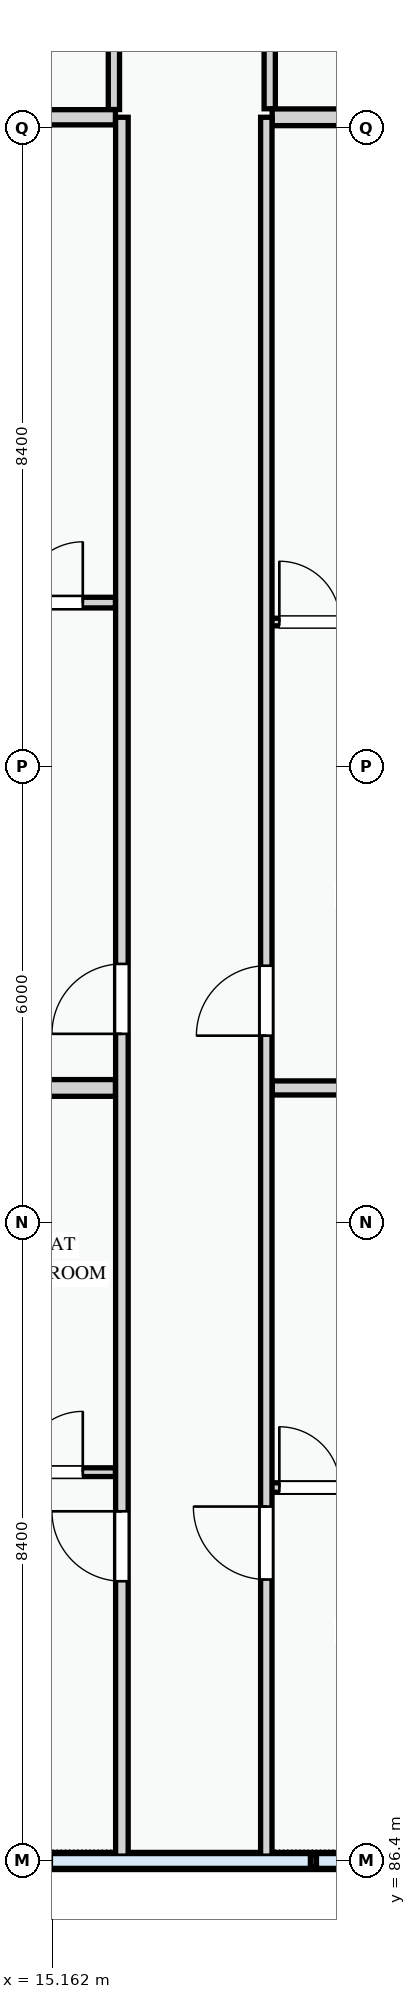
"""IFC4 building model, lengths in metres.
Left out: names, types, materials, properties, quantities, classifications, styles, units other than length and angle.
Written with IfcOpenShell. Run it as: python <this file> out.ifc"""

import sys

from ifc_helpers import new_model, si_unit, direction, frame, frame_2d, origin, place, context, subcontext, project, spatial, rectangle, extrude, element, fill, save


model = new_model("IFC4")
c1 = context("Model", 3, precision=1e-05, world=origin(), true_north=direction((0.0, 1.0)))
c2 = subcontext(c1, "Body", "Model", "MODEL_VIEW")
j1 = project(units=[si_unit("LENGTHUNIT", "METRE"), si_unit("PLANEANGLEUNIT", "RADIAN")], contexts=[c1])
p1 = place(None, origin())
s1 = spatial("IfcSite", under=j1, at=p1, CompositionType="ELEMENT")
p2 = place(p1, origin())
s2 = spatial("IfcBuilding", under=s1, at=p2, CompositionType="ELEMENT")
p3 = place(p2, frame((0.0, 0.0, 51.0)))
s3 = spatial("IfcBuildingStorey", under=s2, at=p3, CompositionType="ELEMENT", Elevation=51.0)
p4 = place(p3, frame((8.4, 86.4, 3.3), z_axis=(0.0, 0.0, 1.0), x_axis=(1.0, 0.0, 0.0)))
e1 = element("IfcWall", 1, at=p4, inside=s3, PredefinedType="PARAPET", context=c2, shape_type="SweptSolid", body=[
    extrude(rectangle(XDim=14.4, YDim=0.225, at=frame_2d((7.2, 0.0))), origin(), (0.0, 0.0, 1.0), 1.15),
])
p5 = place(p3, frame((15.975, 113.324, 0.0), z_axis=(0.0, 0.0, 1.0), x_axis=(0.0, -1.0, 0.0)))
e2 = element("IfcWall", 2, at=p5, inside=s3, PredefinedType="PARTITIONING", context=c2, shape_type="SweptSolid", body=[
    extrude(rectangle(XDim=3.882, YDim=0.148, at=frame_2d((1.941, 0.0))), origin(), (0.0, 0.0, 1.0), 3.0),
])
p6 = place(p3, frame((18.025, 113.324, 0.0), z_axis=(0.0, 0.0, 1.0), x_axis=(0.0, -1.0, 0.0)))
e3 = element("IfcWall", 3, at=p6, inside=s3, PredefinedType="PARTITIONING", context=c2, shape_type="SweptSolid", body=[
    extrude(rectangle(XDim=3.872, YDim=0.148, at=frame_2d((1.936, 0.0))), origin(), (0.0, 0.0, 1.0), 3.0),
])
p7 = place(p3, frame((8.57, 91.515, 0.0), z_axis=(0.0, 0.0, 1.0), x_axis=(1.0, 0.0, 0.0)))
e4 = element("IfcWall", 4, at=p7, inside=s3, PredefinedType="PARTITIONING", context=c2, shape_type="SweptSolid", body=[
    extrude(rectangle(XDim=7.426, YDim=0.115, at=frame_2d((3.713, 0.0))), origin(), (0.0, 0.0, 1.0), 3.0),
])
p8 = place(p7, frame((1.294, 0.0, 0.0)))
e5 = element("IfcOpeningElement", 5, at=p8, cuts=e4, PredefinedType="OPENING", context=c2, shape_type="SweptSolid", body=[
    extrude(rectangle(XDim=0.85, YDim=2.1, at=frame_2d((0.425, 1.05))), frame((0.0, 0.067, 0.0), z_axis=(0.0, -1.0, 0.0), x_axis=(1.0, 0.0, 0.0)), (0.0, 0.0, 1.0), 0.135),
])
p9 = place(p7, frame((4.19, 0.0, 0.0)))
e6 = element("IfcOpeningElement", 6, at=p9, cuts=e4, PredefinedType="OPENING", context=c2, shape_type="SweptSolid", body=[
    extrude(rectangle(XDim=0.85, YDim=2.1, at=frame_2d((0.425, 1.05))), frame((0.0, 0.067, 0.0), z_axis=(0.0, -1.0, 0.0), x_axis=(1.0, 0.0, 0.0)), (0.0, 0.0, 1.0), 0.135),
])
p10 = place(p7, frame((6.196, 0.0, 0.0)))
e7 = element("IfcOpeningElement", 7, at=p10, cuts=e4, PredefinedType="OPENING", context=c2, shape_type="SweptSolid", body=[
    extrude(rectangle(XDim=0.8, YDim=2.1, at=frame_2d((0.4, 1.05))), frame((0.0, 0.067, 0.0), z_axis=(0.0, -1.0, 0.0), x_axis=(1.0, 0.0, 0.0)), (0.0, 0.0, 1.0), 0.135),
])
p11 = place(p3, frame((17.98, 91.313, 0.0), z_axis=(0.0, 0.0, 1.0), x_axis=(1.0, 0.0, 0.0)))
e8 = element("IfcWall", 8, at=p11, inside=s3, PredefinedType="PARTITIONING", context=c2, shape_type="SweptSolid", body=[
    extrude(rectangle(XDim=4.651, YDim=0.125, at=frame_2d((2.325, 0.0))), origin(), (0.0, 0.0, 1.0), 3.0),
])
p12 = place(p11, frame((0.171, 0.0, 0.0)))
e9 = element("IfcOpeningElement", 9, at=p12, cuts=e8, PredefinedType="OPENING", context=c2, shape_type="SweptSolid", body=[
    extrude(rectangle(XDim=0.8, YDim=2.1, at=frame_2d((0.4, 1.05))), frame((0.0, 0.073, 0.0), z_axis=(0.0, -1.0, 0.0), x_axis=(1.0, 0.0, 0.0)), (0.0, 0.0, 1.0), 0.145),
])
p13 = place(p11, frame((1.384, 0.0, 0.0)))
e10 = element("IfcOpeningElement", 10, at=p13, cuts=e8, PredefinedType="OPENING", context=c2, shape_type="SweptSolid", body=[
    extrude(rectangle(XDim=0.85, YDim=2.1, at=frame_2d((0.425, 1.05))), frame((0.0, 0.073, 0.0), z_axis=(0.0, -1.0, 0.0), x_axis=(1.0, 0.0, 0.0)), (0.0, 0.0, 1.0), 0.145),
])
p14 = place(p11, frame((3.193, 0.0, 0.0)))
e11 = element("IfcOpeningElement", 11, at=p14, cuts=e8, PredefinedType="OPENING", context=c2, shape_type="SweptSolid", body=[
    extrude(rectangle(XDim=0.85, YDim=2.1, at=frame_2d((0.425, 1.05))), frame((0.0, 0.073, 0.0), z_axis=(0.0, -1.0, 0.0), x_axis=(1.0, 0.0, 0.0)), (0.0, 0.0, 1.0), 0.145),
])
p15 = place(p3, frame((8.57, 102.955, 0.0), z_axis=(0.0, 0.0, 1.0), x_axis=(1.0, 0.0, 0.0)))
e12 = element("IfcWall", 12, at=p15, inside=s3, PredefinedType="PARTITIONING", context=c2, shape_type="SweptSolid", body=[
    extrude(rectangle(XDim=7.426, YDim=0.14, at=frame_2d((3.713, 0.0))), origin(), (0.0, 0.0, 1.0), 3.0),
])
p16 = place(p15, frame((1.294, 0.0, 0.0)))
e13 = element("IfcOpeningElement", 13, at=p16, cuts=e12, PredefinedType="OPENING", context=c2, shape_type="SweptSolid", body=[
    extrude(rectangle(XDim=0.85, YDim=2.1, at=frame_2d((0.425, 1.05))), frame((0.0, 0.08, 0.0), z_axis=(0.0, -1.0, 0.0), x_axis=(1.0, 0.0, 0.0)), (0.0, 0.0, 1.0), 0.16),
])
p17 = place(p15, frame((4.19, 0.0, 0.0)))
e14 = element("IfcOpeningElement", 14, at=p17, cuts=e12, PredefinedType="OPENING", context=c2, shape_type="SweptSolid", body=[
    extrude(rectangle(XDim=0.82, YDim=2.08, at=frame_2d((0.41, 1.04))), frame((0.0, 0.08, 0.0), z_axis=(0.0, -1.0, 0.0), x_axis=(1.0, 0.0, 0.0)), (0.0, 0.0, 1.0), 0.16),
])
p18 = place(p15, frame((6.196, 0.0, 0.0)))
e15 = element("IfcOpeningElement", 15, at=p18, cuts=e12, PredefinedType="OPENING", context=c2, shape_type="SweptSolid", body=[
    extrude(rectangle(XDim=0.8, YDim=2.1, at=frame_2d((0.4, 1.05))), frame((0.0, 0.08, 0.0), z_axis=(0.0, -1.0, 0.0), x_axis=(1.0, 0.0, 0.0)), (0.0, 0.0, 1.0), 0.16),
])
p19 = place(p3, frame((17.98, 102.7, 0.0), z_axis=(0.0, 0.0, 1.0), x_axis=(1.0, 0.0, 0.0)))
e16 = element("IfcWall", 16, at=p19, inside=s3, PredefinedType="PARTITIONING", context=c2, shape_type="SweptSolid", body=[
    extrude(rectangle(XDim=4.651, YDim=0.1, at=frame_2d((2.325, 0.0))), origin(), (0.0, 0.0, 1.0), 3.0),
])
p20 = place(p19, frame((0.171, 0.0, 0.0)))
e17 = element("IfcOpeningElement", 17, at=p20, cuts=e16, PredefinedType="OPENING", context=c2, shape_type="SweptSolid", body=[
    extrude(rectangle(XDim=0.8, YDim=2.1, at=frame_2d((0.4, 1.05))), frame((0.0, 0.06, 0.0), z_axis=(0.0, -1.0, 0.0), x_axis=(1.0, 0.0, 0.0)), (0.0, 0.0, 1.0), 0.12),
])
p21 = place(p19, frame((1.384, 0.0, 0.0)))
e18 = element("IfcOpeningElement", 18, at=p21, cuts=e16, PredefinedType="OPENING", context=c2, shape_type="SweptSolid", body=[
    extrude(rectangle(XDim=0.85, YDim=2.1, at=frame_2d((0.425, 1.05))), frame((0.0, 0.06, 0.0), z_axis=(0.0, -1.0, 0.0), x_axis=(1.0, 0.0, 0.0)), (0.0, 0.0, 1.0), 0.12),
])
p22 = place(p19, frame((3.193, 0.0, 0.0)))
e19 = element("IfcOpeningElement", 19, at=p22, cuts=e16, PredefinedType="OPENING", context=c2, shape_type="SweptSolid", body=[
    extrude(rectangle(XDim=0.82, YDim=2.08, at=frame_2d((0.41, 1.04))), frame((0.0, 0.06, 0.0), z_axis=(0.0, -1.0, 0.0), x_axis=(1.0, 0.0, 0.0)), (0.0, 0.0, 1.0), 0.12),
])
p23 = place(p3, frame((8.57, 96.57, 0.0), z_axis=(0.0, 0.0, 1.0), x_axis=(1.0, 0.0, 0.0)))
e20 = element("IfcWall", 20, at=p23, inside=s3, PredefinedType="PARTITIONING", context=c2, shape_type="SweptSolid", body=[
    extrude(rectangle(XDim=7.426, YDim=0.22, at=frame_2d((3.713, 0.0))), origin(), (0.0, 0.0, 1.0), 3.0),
])
p24 = place(p3, frame((18.057, 96.57, 0.0), z_axis=(0.0, 0.0, 1.0), x_axis=(1.0, 0.0, 0.0)))
e21 = element("IfcWall", 21, at=p24, inside=s3, PredefinedType="PARTITIONING", context=c2, shape_type="SweptSolid", body=[
    extrude(rectangle(XDim=4.683, YDim=0.185, at=frame_2d((2.342, 0.0))), origin(), (0.0, 0.0, 1.0), 3.0),
])
p25 = place(p3, frame((8.57, 109.34, 0.0), z_axis=(0.0, 0.0, 1.0), x_axis=(1.0, 0.0, 0.0)))
e22 = element("IfcWall", 22, at=p25, inside=s3, PredefinedType="PARTITIONING", context=c2, shape_type="SweptSolid", body=[
    extrude(rectangle(XDim=7.426, YDim=0.2, at=frame_2d((3.713, 0.0))), origin(), (0.0, 0.0, 1.0), 2.395),
])
p26 = place(p3, frame((18.057, 109.34, 0.0), z_axis=(0.0, 0.0, 1.0), x_axis=(1.0, 0.0, 0.0)))
e23 = element("IfcWall", 23, at=p26, inside=s3, PredefinedType="PARTITIONING", context=c2, shape_type="SweptSolid", body=[
    extrude(rectangle(XDim=4.683, YDim=0.22, at=frame_2d((2.342, 0.0))), origin(), (0.0, 0.0, 1.0), 2.395),
])
p27 = place(p3, frame((16.08, 86.46, 0.0), z_axis=(0.0, 0.0, 1.0), x_axis=(0.0, 1.0, 0.0)))
e24 = element("IfcWall", 24, at=p27, inside=s3, PredefinedType="PARTITIONING", context=c2, shape_type="SweptSolid", body=[
    extrude(rectangle(XDim=22.88, YDim=0.165, at=frame_2d((11.44, 0.0))), origin(), (0.0, 0.0, 1.0), 3.0),
])
p28 = place(p27, frame((3.62, 0.0, 0.0)))
e25 = element("IfcOpeningElement", 25, at=p28, cuts=e24, PredefinedType="OPENING", context=c2, shape_type="SweptSolid", body=[
    extrude(rectangle(XDim=0.92, YDim=2.1, at=frame_2d((0.46, 1.05))), frame((0.0, 0.093, 0.0), z_axis=(0.0, -1.0, 0.0), x_axis=(1.0, 0.0, 0.0)), (0.0, 0.0, 1.0), 0.185),
])
p29 = place(p27, frame((10.822, 0.0, 0.0)))
e26 = element("IfcOpeningElement", 26, at=p29, cuts=e24, PredefinedType="OPENING", context=c2, shape_type="SweptSolid", body=[
    extrude(rectangle(XDim=0.92, YDim=2.1, at=frame_2d((0.46, 1.05))), frame((0.0, 0.093, 0.0), z_axis=(0.0, -1.0, 0.0), x_axis=(1.0, 0.0, 0.0)), (0.0, 0.0, 1.0), 0.185),
])
p30 = place(p3, frame((17.98, 86.46, 0.0), z_axis=(0.0, 0.0, 1.0), x_axis=(0.0, 1.0, 0.0)))
e27 = element("IfcWall", 27, at=p30, inside=s3, PredefinedType="PARTITIONING", context=c2, shape_type="SweptSolid", body=[
    extrude(rectangle(XDim=22.88, YDim=0.15, at=frame_2d((11.44, 0.0))), origin(), (0.0, 0.0, 1.0), 3.0),
])
p31 = place(p30, frame((3.643, 0.0, 0.0)))
e28 = element("IfcOpeningElement", 28, at=p31, cuts=e27, PredefinedType="OPENING", context=c2, shape_type="SweptSolid", body=[
    extrude(rectangle(XDim=0.96, YDim=2.12, at=frame_2d((0.48, 1.06))), frame((0.0, 0.085, 0.0), z_axis=(0.0, -1.0, 0.0), x_axis=(1.0, 0.0, 0.0)), (0.0, 0.0, 1.0), 0.17),
])
p32 = place(p30, frame((10.798, 0.0, 0.0)))
e29 = element("IfcOpeningElement", 29, at=p32, cuts=e27, PredefinedType="OPENING", context=c2, shape_type="SweptSolid", body=[
    extrude(rectangle(XDim=0.92, YDim=2.1, at=frame_2d((0.46, 1.05))), frame((0.0, 0.085, 0.0), z_axis=(0.0, -1.0, 0.0), x_axis=(1.0, 0.0, 0.0)), (0.0, 0.0, 1.0), 0.17),
])
p33 = place(p10, origin())
e30 = element("IfcDoor", 30, at=p33, inside=s3, OperationType="SINGLE_SWING_RIGHT", PredefinedType="DOOR", context=c2, shape_type="SweptSolid", body=[
    extrude(rectangle(XDim=0.8, YDim=2.1, at=frame_2d((0.4, 1.05))), frame((0.0, 0.025, 0.0), z_axis=(0.0, -1.0, 0.0), x_axis=(1.0, 0.0, 0.0)), (0.0, 0.0, 1.0), 0.05),
])
fill(e7, e30)
p34 = place(p12, origin())
e31 = element("IfcDoor", 31, at=p34, inside=s3, OperationType="SINGLE_SWING_LEFT", PredefinedType="DOOR", context=c2, shape_type="SweptSolid", body=[
    extrude(rectangle(XDim=0.8, YDim=2.1, at=frame_2d((0.4, 1.05))), frame((0.0, 0.025, 0.0), z_axis=(0.0, -1.0, 0.0), x_axis=(1.0, 0.0, 0.0)), (0.0, 0.0, 1.0), 0.05),
])
fill(e9, e31)
p35 = place(p18, origin())
e32 = element("IfcDoor", 32, at=p35, inside=s3, OperationType="SINGLE_SWING_RIGHT", PredefinedType="DOOR", context=c2, shape_type="SweptSolid", body=[
    extrude(rectangle(XDim=0.8, YDim=2.1, at=frame_2d((0.4, 1.05))), frame((0.0, 0.025, 0.0), z_axis=(0.0, -1.0, 0.0), x_axis=(1.0, 0.0, 0.0)), (0.0, 0.0, 1.0), 0.05),
])
fill(e15, e32)
p36 = place(p20, origin())
e33 = element("IfcDoor", 33, at=p36, inside=s3, OperationType="SINGLE_SWING_LEFT", PredefinedType="DOOR", context=c2, shape_type="SweptSolid", body=[
    extrude(rectangle(XDim=0.8, YDim=2.1, at=frame_2d((0.4, 1.05))), frame((0.0, 0.025, 0.0), z_axis=(0.0, -1.0, 0.0), x_axis=(1.0, 0.0, 0.0)), (0.0, 0.0, 1.0), 0.05),
])
fill(e17, e33)
p37 = place(p28, origin())
e34 = element("IfcDoor", 34, at=p37, inside=s3, OperationType="SINGLE_SWING_RIGHT", PredefinedType="DOOR", context=c2, shape_type="SweptSolid", body=[
    extrude(rectangle(XDim=0.92, YDim=2.1, at=frame_2d((0.46, 1.05))), frame((0.0, 0.025, 0.0), z_axis=(0.0, -1.0, 0.0), x_axis=(1.0, 0.0, 0.0)), (0.0, 0.0, 1.0), 0.05),
])
fill(e25, e34)
p38 = place(p29, origin())
e35 = element("IfcDoor", 35, at=p38, inside=s3, OperationType="SINGLE_SWING_LEFT", PredefinedType="DOOR", context=c2, shape_type="SweptSolid", body=[
    extrude(rectangle(XDim=0.92, YDim=2.1, at=frame_2d((0.46, 1.05))), frame((0.0, 0.025, 0.0), z_axis=(0.0, -1.0, 0.0), x_axis=(1.0, 0.0, 0.0)), (0.0, 0.0, 1.0), 0.05),
])
fill(e26, e35)
p39 = place(p31, origin())
e36 = element("IfcDoor", 36, at=p39, inside=s3, OperationType="SINGLE_SWING_RIGHT", PredefinedType="DOOR", context=c2, shape_type="SweptSolid", body=[
    extrude(rectangle(XDim=0.96, YDim=2.12, at=frame_2d((0.48, 1.06))), frame((0.0, 0.025, 0.0), z_axis=(0.0, -1.0, 0.0), x_axis=(1.0, 0.0, 0.0)), (0.0, 0.0, 1.0), 0.05),
])
fill(e28, e36)
p40 = place(p32, origin())
e37 = element("IfcDoor", 37, at=p40, inside=s3, OperationType="SINGLE_SWING_LEFT", PredefinedType="DOOR", context=c2, shape_type="SweptSolid", body=[
    extrude(rectangle(XDim=0.92, YDim=2.1, at=frame_2d((0.46, 1.05))), frame((0.0, 0.025, 0.0), z_axis=(0.0, -1.0, 0.0), x_axis=(1.0, 0.0, 0.0)), (0.0, 0.0, 1.0), 0.05),
])
fill(e29, e37)
save(model, sys.argv[1])
